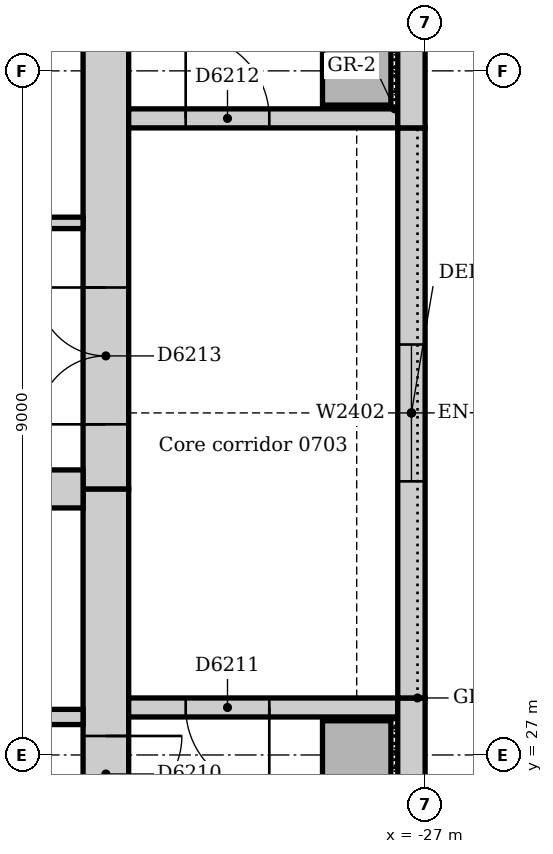
"""IFC4 building model, lengths in metres.
Left out: names, types, materials, properties, quantities, classifications, styles, units other than length and angle.
Written with IfcOpenShell. Run it as: python <this file> out.ifc"""

import sys

from ifc_helpers import new_model, si_unit, direction, frame, frame_2d, origin, origin_2d, place, context, subcontext, project, spatial, rectangle, extrude, element, fill, save


model = new_model("IFC4")
c1 = context("Model", 3, precision=1e-05, world=origin(), true_north=direction((0.0, 1.0)))
c2 = subcontext(c1, "Body", "Model", "MODEL_VIEW")
j1 = project(units=[si_unit("LENGTHUNIT", "METRE"), si_unit("PLANEANGLEUNIT", "RADIAN")], contexts=[c1])
p1 = place(None, origin())
s1 = spatial("IfcSite", under=j1, at=p1, CompositionType="ELEMENT")
p2 = place(p1, origin())
s2 = spatial("IfcBuilding", under=s1, at=p2, CompositionType="ELEMENT")
p3 = place(p2, frame((0.0, 0.0, 34.0)))
s3 = spatial("IfcBuildingStorey", under=s2, at=p3, CompositionType="ELEMENT", Elevation=34.0)
p4 = place(p3, frame((-31.2, 21.0, 0.0), z_axis=(0.0, 0.0, 1.0), x_axis=(0.0, 1.0, 0.0)))
e1 = element("IfcWall", 1, at=p4, inside=s3, PredefinedType="SOLIDWALL", context=c2, shape_type="SweptSolid", body=[
    extrude(rectangle(XDim=9.5, YDim=0.6, at=frame_2d((4.75, 0.0))), origin(), (0.0, 0.0, 1.0), 4.0),
])
p5 = place(p4, frame((5.25, 0.0, 0.0)))
e2 = element("IfcOpeningElement", 2, at=p5, cuts=e1, PredefinedType="OPENING", context=c2, shape_type="SweptSolid", body=[
    extrude(rectangle(XDim=1.0, YDim=2.1, at=frame_2d((0.5, 1.05))), frame((0.0, 0.31, 0.0), z_axis=(0.0, -1.0, 0.0), x_axis=(1.0, 0.0, 0.0)), (0.0, 0.0, 1.0), 0.62),
])
p6 = place(p3, frame((-31.2, 30.5, 0.0), z_axis=(0.0, 0.0, 1.0), x_axis=(0.0, 1.0, 0.0)))
e3 = element("IfcWall", 3, at=p6, inside=s3, PredefinedType="SOLIDWALL", context=c2, shape_type="SweptSolid", body=[
    extrude(rectangle(XDim=11.5, YDim=0.6, at=frame_2d((5.75, 0.0))), origin(), (0.0, 0.0, 1.0), 4.0),
])
p7 = place(p6, frame((0.85, 0.0, 0.0)))
e4 = element("IfcOpeningElement", 4, at=p7, cuts=e3, PredefinedType="OPENING", context=c2, shape_type="SweptSolid", body=[
    extrude(rectangle(XDim=1.8, YDim=2.1, at=frame_2d((0.9, 1.05))), frame((0.0, 0.31, 0.0), z_axis=(0.0, -1.0, 0.0), x_axis=(1.0, 0.0, 0.0)), (0.0, 0.0, 1.0), 0.62),
])
p8 = place(p3, frame((-42.0, 30.5, 0.0), z_axis=(0.0, 0.0, 1.0), x_axis=(1.0, 0.0, 0.0)))
e5 = element("IfcWall", 5, at=p8, inside=s3, PredefinedType="SOLIDWALL", context=c2, shape_type="SweptSolid", body=[
    extrude(rectangle(XDim=10.5, YDim=0.5, at=frame_2d((5.25, 0.0))), origin(), (0.0, 0.0, 1.0), 4.0),
])
p9 = place(p3, frame((-27.36, 27.625, 0.0), z_axis=(0.0, 0.0, 1.0), x_axis=(-1.0, 0.0, 0.0)))
e6 = element("IfcWall", 6, at=p9, inside=s3, PredefinedType="SOLIDWALL", context=c2, shape_type="SweptSolid", body=[
    extrude(rectangle(XDim=3.54, YDim=0.25, at=frame_2d((1.77, 0.0))), origin(), (0.0, 0.0, 1.0), 4.0),
])
p10 = place(p9, frame((1.69, 0.0, 0.0)))
e7 = element("IfcOpeningElement", 7, at=p10, cuts=e6, PredefinedType="OPENING", context=c2, shape_type="SweptSolid", body=[
    extrude(rectangle(XDim=1.1, YDim=2.1, at=frame_2d((0.55, 1.05))), frame((0.0, 0.135, 0.0), z_axis=(0.0, -1.0, 0.0), x_axis=(1.0, 0.0, 0.0)), (0.0, 0.0, 1.0), 0.27),
])
p11 = place(p3, frame((-30.9, 35.375, 0.0), z_axis=(0.0, 0.0, 1.0), x_axis=(1.0, 0.0, 0.0)))
e8 = element("IfcWall", 8, at=p11, inside=s3, PredefinedType="SOLIDWALL", context=c2, shape_type="SweptSolid", body=[
    extrude(rectangle(XDim=3.54, YDim=0.25, at=frame_2d((1.77, 0.0))), origin(), (0.0, 0.0, 1.0), 4.0),
])
p12 = place(p11, frame((0.75, 0.0, 0.0)))
e9 = element("IfcOpeningElement", 9, at=p12, cuts=e8, PredefinedType="OPENING", context=c2, shape_type="SweptSolid", body=[
    extrude(rectangle(XDim=1.1, YDim=2.1, at=frame_2d((0.55, 1.05))), frame((0.0, 0.135, 0.0), z_axis=(0.0, -1.0, 0.0), x_axis=(1.0, 0.0, 0.0)), (0.0, 0.0, 1.0), 0.27),
])
for number, where, z_axis, x_axis in (
    (10, (-27.9, 27.0, 0.0), (0.0, 0.0, 1.0), (1.0, 0.0, 0.0)),
    (11, (-27.9, 36.0, 0.0), (0.0, 0.0, 1.0), (1.0, 0.0, 0.0)),
):
    element("IfcColumn", number, at=place(p3, frame(where, z_axis=z_axis, x_axis=x_axis)), inside=s3, PredefinedType="COLUMN", context=c2, shape_type="SweptSolid", body=[
        extrude(rectangle(XDim=0.9, YDim=0.9, at=origin_2d()), origin(), (0.0, 0.0, 1.0), 4.0),
    ])
p13 = place(p3, frame((-27.18, 21.0, 0.0), z_axis=(0.0, 0.0, 1.0), x_axis=(0.0, 1.0, 0.0)))
e12 = element("IfcWall", 12, at=p13, inside=s3, PredefinedType="STANDARD", context=c2, shape_type="SweptSolid", body=[
    extrude(rectangle(XDim=6.75, YDim=0.36, at=frame_2d((3.375, 0.0))), origin(), (0.0, 0.0, 1.0), 3.85),
])
p14 = place(p3, frame((-27.18, 27.75, 0.0), z_axis=(0.0, 0.0, 1.0), x_axis=(0.0, 1.0, 0.0)))
e13 = element("IfcWall", 13, at=p14, inside=s3, PredefinedType="STANDARD", context=c2, shape_type="SweptSolid", body=[
    extrude(rectangle(XDim=7.5, YDim=0.36, at=frame_2d((3.75, 0.0))), origin(), (0.0, 0.0, 1.0), 3.85),
])
p15 = place(p14, frame((2.85, 0.0, 1.2)))
e14 = element("IfcOpeningElement", 14, at=p15, cuts=e13, PredefinedType="OPENING", context=c2, shape_type="SweptSolid", body=[
    extrude(rectangle(XDim=1.8, YDim=1.2, at=frame_2d((0.9, 0.6))), frame((0.0, 0.19, 0.0), z_axis=(0.0, -1.0, 0.0), x_axis=(1.0, 0.0, 0.0)), (0.0, 0.0, 1.0), 0.38),
])
p16 = place(p3, frame((-27.18, 35.25, 0.0), z_axis=(0.0, 0.0, 1.0), x_axis=(0.0, 1.0, 0.0)))
e15 = element("IfcWall", 15, at=p16, inside=s3, PredefinedType="STANDARD", context=c2, shape_type="SweptSolid", body=[
    extrude(rectangle(XDim=5.507, YDim=0.36, at=frame_2d((2.754, 0.0))), origin(), (0.0, 0.0, 1.0), 3.85),
])
p17 = place(p3, frame((-34.9, 27.5, 0.0), z_axis=(0.0, 0.0, 1.0), x_axis=(1.0, 0.0, 0.0)))
e16 = element("IfcWall", 16, at=p17, inside=s3, PredefinedType="SOLIDWALL", context=c2, shape_type="SweptSolid", body=[
    extrude(rectangle(XDim=3.4, YDim=0.2, at=frame_2d((1.7, 0.0))), origin(), (0.0, 0.0, 1.0), 4.0),
])
p18 = place(p17, frame((1.1, 0.0, 0.0)))
e17 = element("IfcOpeningElement", 17, at=p18, cuts=e16, PredefinedType="OPENING", context=c2, shape_type="SweptSolid", body=[
    extrude(rectangle(XDim=1.1, YDim=2.1, at=frame_2d((0.55, 1.05))), frame((0.0, 0.11, 0.0), z_axis=(0.0, -1.0, 0.0), x_axis=(1.0, 0.0, 0.0)), (0.0, 0.0, 1.0), 0.22),
])
p19 = place(p3, frame((-34.075, 34.0, 0.0), z_axis=(0.0, 0.0, 1.0), x_axis=(1.0, 0.0, 0.0)))
e18 = element("IfcWall", 18, at=p19, inside=s3, PredefinedType="SOLIDWALL", context=c2, shape_type="SweptSolid", body=[
    extrude(rectangle(XDim=2.575, YDim=0.15, at=frame_2d((1.288, 0.0))), origin(), (0.0, 0.0, 1.0), 4.0),
])
p20 = place(p15, origin())
e19 = element("IfcWindow", 19, at=p20, inside=s3, PartitioningType="SINGLE_PANEL", PredefinedType="WINDOW", context=c2, shape_type="SweptSolid", body=[
    extrude(rectangle(XDim=1.8, YDim=1.2, at=frame_2d((0.9, 0.6))), frame((0.0, 0.13, 0.0), z_axis=(0.0, -1.0, 0.0), x_axis=(1.0, 0.0, 0.0)), (0.0, 0.0, 1.0), 0.06),
])
fill(e14, e19)
p21 = place(p5, frame((1.0, 0.0, 0.0), z_axis=(0.0, 0.0, 1.0), x_axis=(-1.0, 0.0, 0.0)))
e20 = element("IfcDoor", 20, at=p21, inside=s3, OperationType="SINGLE_SWING_LEFT", PredefinedType="DOOR", context=c2, shape_type="SweptSolid", body=[
    extrude(rectangle(XDim=1.0, YDim=2.1, at=frame_2d((0.5, 1.05))), frame((0.0, 0.025, 0.0), z_axis=(0.0, -1.0, 0.0), x_axis=(1.0, 0.0, 0.0)), (0.0, 0.0, 1.0), 0.05),
])
fill(e2, e20)
p22 = place(p10, origin())
e21 = element("IfcDoor", 21, at=p22, inside=s3, OperationType="SINGLE_SWING_LEFT", PredefinedType="DOOR", context=c2, shape_type="SweptSolid", body=[
    extrude(rectangle(XDim=1.1, YDim=2.1, at=frame_2d((0.55, 1.05))), frame((0.0, 0.025, 0.0), z_axis=(0.0, -1.0, 0.0), x_axis=(1.0, 0.0, 0.0)), (0.0, 0.0, 1.0), 0.05),
])
fill(e7, e21)
p23 = place(p12, origin())
e22 = element("IfcDoor", 22, at=p23, inside=s3, OperationType="SINGLE_SWING_LEFT", PredefinedType="DOOR", context=c2, shape_type="SweptSolid", body=[
    extrude(rectangle(XDim=1.1, YDim=2.1, at=frame_2d((0.55, 1.05))), frame((0.0, 0.025, 0.0), z_axis=(0.0, -1.0, 0.0), x_axis=(1.0, 0.0, 0.0)), (0.0, 0.0, 1.0), 0.05),
])
fill(e9, e22)
p24 = place(p7, origin())
e23 = element("IfcDoor", 23, at=p24, inside=s3, OperationType="DOUBLE_DOOR_SINGLE_SWING", PredefinedType="DOOR", context=c2, shape_type="SweptSolid", body=[
    extrude(rectangle(XDim=1.8, YDim=2.1, at=frame_2d((0.9, 1.05))), frame((0.0, 0.025, 0.0), z_axis=(0.0, -1.0, 0.0), x_axis=(1.0, 0.0, 0.0)), (0.0, 0.0, 1.0), 0.05),
])
fill(e4, e23)
save(model, sys.argv[1])
